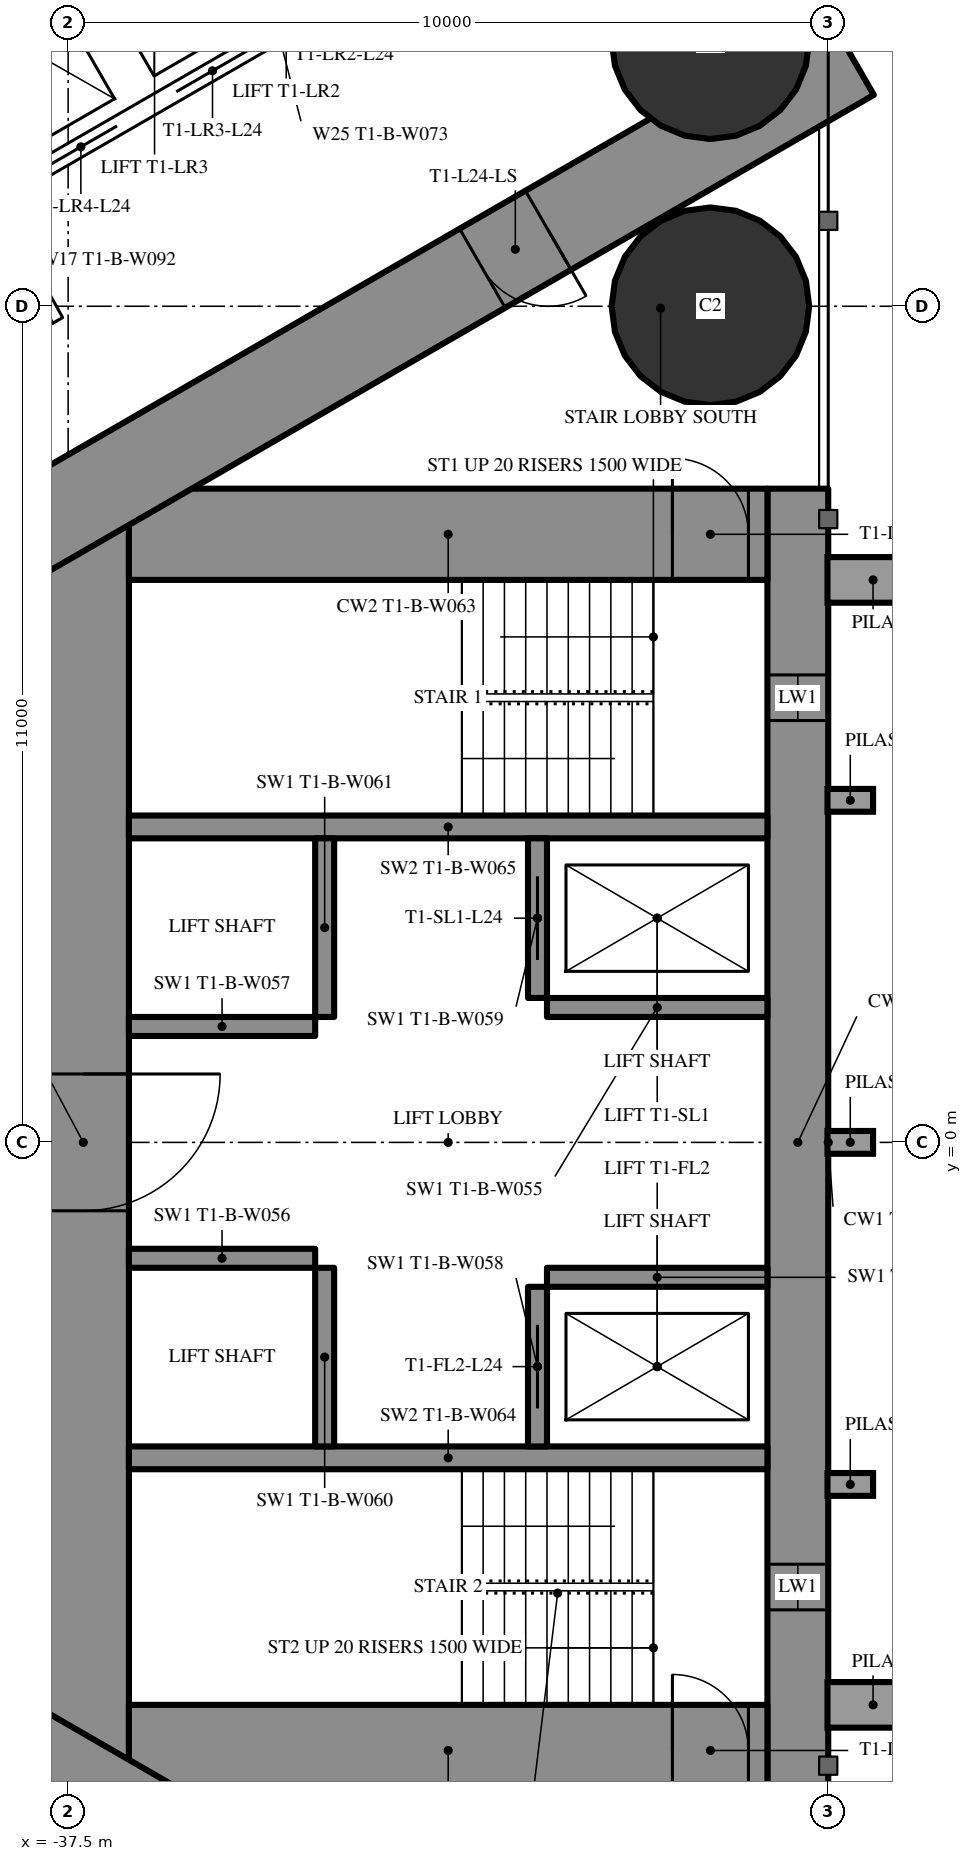
"""IFC4 building model, lengths in metres.
Left out: names, types, materials, properties, quantities, classifications, styles, units other than length and angle.
Written with IfcOpenShell. Run it as: python <this file> out.ifc"""

import sys

from ifc_helpers import new_model, si_unit, direction, frame, frame_2d, origin, origin_2d, place, context, subcontext, project, spatial, rectangle, hollow_circle, extrude, element, fill, save


model = new_model("IFC4")
c1 = context("Model", 3, precision=1e-05, world=origin(), true_north=direction((0.0, 1.0)))
c2 = subcontext(c1, "Body", "Model", "MODEL_VIEW")
j1 = project(units=[si_unit("LENGTHUNIT", "METRE"), si_unit("PLANEANGLEUNIT", "RADIAN")], contexts=[c1])
p1 = place(None, origin())
s1 = spatial("IfcSite", under=j1, at=p1, CompositionType="ELEMENT")
p2 = place(p1, origin())
s2 = spatial("IfcBuilding", under=s1, at=p2, CompositionType="ELEMENT")
p3 = place(p2, frame((0.0, 0.0, 94.1)))
s3 = spatial("IfcBuildingStorey", under=s2, at=p3, CompositionType="ELEMENT", Elevation=94.1)
for number, where, z_axis, x_axis in (
    (1, (-29.05, 11.0, 0.0), (0.0, 0.0, 1.0), (1.0, 0.0, 0.0)),
    (2, (-29.05, 14.5, 0.0), (0.0, 0.0, 1.0), (1.0, 0.0, 0.0)),
):
    element("IfcColumn", number, at=place(p3, frame(where, z_axis=z_axis, x_axis=x_axis)), inside=s3, PredefinedType="COLUMN", context=c2, shape_type="SweptSolid", body=[
        extrude(hollow_circle(Radius=1.3, WallThickness=0.1, at=origin_2d()), origin(), (0.0, 0.0, 1.0), 3.5),
    ])
p4 = place(p3, frame((-27.9, 8.6, 0.0), z_axis=(0.0, 0.0, 1.0), x_axis=(0.0, -1.0, 0.0)))
e3 = element("IfcWall", 3, at=p4, inside=s3, PredefinedType="SHEAR", context=c2, shape_type="SweptSolid", body=[
    extrude(rectangle(XDim=17.2, YDim=0.8, at=frame_2d((8.6, 0.0))), origin(), (0.0, 0.0, 1.0), 3.5),
])
p5 = place(p4, frame((2.45, 0.0, 0.6)))
e4 = element("IfcOpeningElement", 4, at=p5, cuts=e3, PredefinedType="OPENING", context=c2, shape_type="SweptSolid", body=[
    extrude(rectangle(XDim=0.6, YDim=2.1, at=frame_2d((0.3, 1.05))), frame((0.0, 0.41, 0.0), z_axis=(0.0, -1.0, 0.0), x_axis=(1.0, 0.0, 0.0)), (0.0, 0.0, 1.0), 0.82),
])
p6 = place(p4, frame((14.15, 0.0, 0.6)))
e5 = element("IfcOpeningElement", 5, at=p6, cuts=e3, PredefinedType="OPENING", context=c2, shape_type="SweptSolid", body=[
    extrude(rectangle(XDim=0.6, YDim=2.1, at=frame_2d((0.3, 1.05))), frame((0.0, 0.41, 0.0), z_axis=(0.0, -1.0, 0.0), x_axis=(1.0, 0.0, 0.0)), (0.0, 0.0, 1.0), 0.82),
])
p7 = place(p3, frame((-37.3, 8.6, 0.0), z_axis=(0.0, 0.0, 1.0), x_axis=(0.0, -1.0, 0.0)))
e6 = element("IfcWall", 6, at=p7, inside=s3, PredefinedType="SHEAR", context=c2, shape_type="SweptSolid", body=[
    extrude(rectangle(XDim=17.2, YDim=1.2, at=frame_2d((8.6, 0.0))), origin(), (0.0, 0.0, 1.0), 3.5),
])
p8 = place(p7, frame((7.7, 0.0, 0.0)))
e7 = element("IfcOpeningElement", 7, at=p8, cuts=e6, PredefinedType="OPENING", context=c2, shape_type="SweptSolid", body=[
    extrude(rectangle(XDim=1.8, YDim=2.2, at=frame_2d((0.9, 1.1))), frame((0.0, 0.61, 0.0), z_axis=(0.0, -1.0, 0.0), x_axis=(1.0, 0.0, 0.0)), (0.0, 0.0, 1.0), 1.22),
])
p9 = place(p3, frame((-28.3, 8.0, 0.0), z_axis=(0.0, 0.0, 1.0), x_axis=(-1.0, 0.0, 0.0)))
e8 = element("IfcWall", 8, at=p9, inside=s3, PredefinedType="SHEAR", context=c2, shape_type="SweptSolid", body=[
    extrude(rectangle(XDim=8.4, YDim=1.2, at=frame_2d((4.2, 0.0))), origin(), (0.0, 0.0, 1.0), 3.5),
])
p10 = place(p9, frame((0.25, 0.0, 0.0)))
e9 = element("IfcOpeningElement", 9, at=p10, cuts=e8, PredefinedType="OPENING", context=c2, shape_type="SweptSolid", body=[
    extrude(rectangle(XDim=1.0, YDim=2.2, at=frame_2d((0.5, 1.1))), frame((0.0, 0.61, 0.0), z_axis=(0.0, -1.0, 0.0), x_axis=(1.0, 0.0, 0.0)), (0.0, 0.0, 1.0), 1.22),
])
p11 = place(p3, frame((-28.3, -8.0, 0.0), z_axis=(0.0, 0.0, 1.0), x_axis=(-1.0, 0.0, 0.0)))
e10 = element("IfcWall", 10, at=p11, inside=s3, PredefinedType="SHEAR", context=c2, shape_type="SweptSolid", body=[
    extrude(rectangle(XDim=8.4, YDim=1.2, at=frame_2d((4.2, 0.0))), origin(), (0.0, 0.0, 1.0), 3.5),
])
p12 = place(p11, frame((0.25, 0.0, 0.0)))
e11 = element("IfcOpeningElement", 11, at=p12, cuts=e10, PredefinedType="OPENING", context=c2, shape_type="SweptSolid", body=[
    extrude(rectangle(XDim=1.0, YDim=2.2, at=frame_2d((0.5, 1.1))), frame((0.0, 0.61, 0.0), z_axis=(0.0, -1.0, 0.0), x_axis=(1.0, 0.0, 0.0)), (0.0, 0.0, 1.0), 1.22),
])
for number, where, z_axis, x_axis in (
    (12, (-28.3, 4.15, 0.0), (0.0, 0.0, 1.0), (-1.0, 0.0, 0.0)),
    (13, (-28.3, -4.15, 0.0), (0.0, 0.0, 1.0), (-1.0, 0.0, 0.0)),
):
    element("IfcWall", number, at=place(p3, frame(where, z_axis=z_axis, x_axis=x_axis)), inside=s3, PredefinedType="SHEAR", context=c2, shape_type="SweptSolid", body=[
        extrude(rectangle(XDim=8.4, YDim=0.3, at=frame_2d((4.2, 0.0))), origin(), (0.0, 0.0, 1.0), 3.5),
    ])
p13 = place(p3, frame((-31.325, 4.0, 0.0), z_axis=(0.0, 0.0, 1.0), x_axis=(0.0, -1.0, 0.0)))
e14 = element("IfcWall", 14, at=p13, inside=s3, PredefinedType="SHEAR", context=c2, shape_type="SweptSolid", body=[
    extrude(rectangle(XDim=2.1, YDim=0.25, at=frame_2d((1.05, 0.0))), origin(), (0.0, 0.0, 1.0), 3.5),
])
p14 = place(p13, frame((0.5, 0.0, 0.0)))
e15 = element("IfcOpeningElement", 15, at=p14, cuts=e14, PredefinedType="OPENING", context=c2, shape_type="SweptSolid", body=[
    extrude(rectangle(XDim=1.1, YDim=2.2, at=frame_2d((0.55, 1.1))), frame((0.0, 0.135, 0.0), z_axis=(0.0, -1.0, 0.0), x_axis=(1.0, 0.0, 0.0)), (0.0, 0.0, 1.0), 0.27),
])
p15 = place(p3, frame((-34.125, 4.0, 0.0), z_axis=(0.0, 0.0, 1.0), x_axis=(0.0, -1.0, 0.0)))
e16 = element("IfcWall", 16, at=p15, inside=s3, PredefinedType="SHEAR", context=c2, shape_type="SweptSolid", body=[
    extrude(rectangle(XDim=2.35, YDim=0.25, at=frame_2d((1.175, 0.0))), origin(), (0.0, 0.0, 1.0), 3.5),
])
p16 = place(p3, frame((-28.3, 1.775, 0.0), z_axis=(0.0, 0.0, 1.0), x_axis=(-1.0, 0.0, 0.0)))
e17 = element("IfcWall", 17, at=p16, inside=s3, PredefinedType="SHEAR", context=c2, shape_type="SweptSolid", body=[
    extrude(rectangle(XDim=2.9, YDim=0.25, at=frame_2d((1.45, 0.0))), origin(), (0.0, 0.0, 1.0), 3.5),
])
p17 = place(p3, frame((-34.25, 1.525, 0.0), z_axis=(0.0, 0.0, 1.0), x_axis=(-1.0, 0.0, 0.0)))
e18 = element("IfcWall", 18, at=p17, inside=s3, PredefinedType="SHEAR", context=c2, shape_type="SweptSolid", body=[
    extrude(rectangle(XDim=2.45, YDim=0.25, at=frame_2d((1.225, 0.0))), origin(), (0.0, 0.0, 1.0), 3.5),
])
p18 = place(p3, frame((-31.325, -1.9, 0.0), z_axis=(0.0, 0.0, 1.0), x_axis=(0.0, -1.0, 0.0)))
e19 = element("IfcWall", 19, at=p18, inside=s3, PredefinedType="SHEAR", context=c2, shape_type="SweptSolid", body=[
    extrude(rectangle(XDim=2.1, YDim=0.25, at=frame_2d((1.05, 0.0))), origin(), (0.0, 0.0, 1.0), 3.5),
])
p19 = place(p18, frame((0.5, 0.0, 0.0)))
e20 = element("IfcOpeningElement", 20, at=p19, cuts=e19, PredefinedType="OPENING", context=c2, shape_type="SweptSolid", body=[
    extrude(rectangle(XDim=1.1, YDim=2.2, at=frame_2d((0.55, 1.1))), frame((0.0, 0.135, 0.0), z_axis=(0.0, -1.0, 0.0), x_axis=(1.0, 0.0, 0.0)), (0.0, 0.0, 1.0), 0.27),
])
p20 = place(p3, frame((-34.125, -1.65, 0.0), z_axis=(0.0, 0.0, 1.0), x_axis=(0.0, -1.0, 0.0)))
e21 = element("IfcWall", 21, at=p20, inside=s3, PredefinedType="SHEAR", context=c2, shape_type="SweptSolid", body=[
    extrude(rectangle(XDim=2.35, YDim=0.25, at=frame_2d((1.175, 0.0))), origin(), (0.0, 0.0, 1.0), 3.5),
])
p21 = place(p3, frame((-28.3, -1.775, 0.0), z_axis=(0.0, 0.0, 1.0), x_axis=(-1.0, 0.0, 0.0)))
e22 = element("IfcWall", 22, at=p21, inside=s3, PredefinedType="SHEAR", context=c2, shape_type="SweptSolid", body=[
    extrude(rectangle(XDim=2.9, YDim=0.25, at=frame_2d((1.45, 0.0))), origin(), (0.0, 0.0, 1.0), 3.5),
])
p22 = place(p3, frame((-34.25, -1.525, 0.0), z_axis=(0.0, 0.0, 1.0), x_axis=(-1.0, 0.0, 0.0)))
e23 = element("IfcWall", 23, at=p22, inside=s3, PredefinedType="SHEAR", context=c2, shape_type="SweptSolid", body=[
    extrude(rectangle(XDim=2.45, YDim=0.25, at=frame_2d((1.225, 0.0))), origin(), (0.0, 0.0, 1.0), 3.5),
])
p23 = place(p3, frame((-27.2, 14.3, 0.0), z_axis=(0.0, 0.0, 1.0), x_axis=(-0.866026593062, -0.499997940104, 0.0)))
e24 = element("IfcWall", 24, at=p23, inside=s3, PredefinedType="SHEAR", context=c2, shape_type="SweptSolid", body=[
    extrude(rectangle(XDim=28.946, YDim=1.2, at=frame_2d((14.473, 0.0))), origin(), (0.0, 0.0, 1.0), 3.5),
])
p24 = place(p23, frame((4.6, 0.0, 0.0)))
e25 = element("IfcOpeningElement", 25, at=p24, cuts=e24, PredefinedType="OPENING", context=c2, shape_type="SweptSolid", body=[
    extrude(rectangle(XDim=1.0, YDim=2.2, at=frame_2d((0.5, 1.1))), frame((0.0, 0.61, 0.0), z_axis=(0.0, -1.0, 0.0), x_axis=(1.0, 0.0, 0.0)), (0.0, 0.0, 1.0), 1.22),
])
p25 = place(p23, frame((13.395, 0.0, 0.0)))
e26 = element("IfcOpeningElement", 26, at=p25, cuts=e24, PredefinedType="OPENING", context=c2, shape_type="SweptSolid", body=[
    extrude(rectangle(XDim=1.8, YDim=2.2, at=frame_2d((0.9, 1.1))), frame((0.0, 0.61, 0.0), z_axis=(0.0, -1.0, 0.0), x_axis=(1.0, 0.0, 0.0)), (0.0, 0.0, 1.0), 1.22),
])
p26 = place(p3, frame((-27.2, -14.3, 0.0), z_axis=(0.0, 0.0, 1.0), x_axis=(-0.866024021859, 0.500002393557, 0.0)))
e27 = element("IfcWall", 27, at=p26, inside=s3, PredefinedType="SHEAR", context=c2, shape_type="SweptSolid", body=[
    extrude(rectangle(XDim=27.907, YDim=1.2, at=frame_2d((13.954, 0.0))), origin(), (0.0, 0.0, 1.0), 3.5),
])
p27 = place(p26, frame((4.6, 0.0, 0.0)))
e28 = element("IfcOpeningElement", 28, at=p27, cuts=e27, PredefinedType="OPENING", context=c2, shape_type="SweptSolid", body=[
    extrude(rectangle(XDim=1.0, YDim=2.2, at=frame_2d((0.5, 1.1))), frame((0.0, 0.61, 0.0), z_axis=(0.0, -1.0, 0.0), x_axis=(1.0, 0.0, 0.0)), (0.0, 0.0, 1.0), 1.22),
])
p28 = place(p26, frame((13.395, 0.0, 0.0)))
e29 = element("IfcOpeningElement", 29, at=p28, cuts=e27, PredefinedType="OPENING", context=c2, shape_type="SweptSolid", body=[
    extrude(rectangle(XDim=1.8, YDim=2.2, at=frame_2d((0.9, 1.1))), frame((0.0, 0.61, 0.0), z_axis=(0.0, -1.0, 0.0), x_axis=(1.0, 0.0, 0.0)), (0.0, 0.0, 1.0), 1.22),
])
p29 = place(p3, frame((-37.7, 10.894, 0.0), z_axis=(0.0, 0.0, 1.0), x_axis=(-0.866027905338, -0.499995667157, 0.0)))
e30 = element("IfcWall", 30, at=p29, inside=s3, PredefinedType="PARTITIONING", context=c2, shape_type="SweptSolid", body=[
    extrude(rectangle(XDim=21.787, YDim=0.2, at=frame_2d((10.894, 0.0))), origin(), (0.0, 0.0, 1.0), 3.25),
])
p30 = place(p29, frame((17.887, 0.0, 0.0)))
e31 = element("IfcOpeningElement", 31, at=p30, cuts=e30, PredefinedType="OPENING", context=c2, shape_type="SweptSolid", body=[
    extrude(rectangle(XDim=0.95, YDim=2.2, at=frame_2d((0.475, 1.1))), frame((0.0, 0.11, 0.0), z_axis=(0.0, -1.0, 0.0), x_axis=(1.0, 0.0, 0.0)), (0.0, 0.0, 1.0), 0.22),
])
p31 = place(p29, frame((9.531, 0.0, 0.0)))
e32 = element("IfcOpeningElement", 32, at=p31, cuts=e30, PredefinedType="OPENING", context=c2, shape_type="SweptSolid", body=[
    extrude(rectangle(XDim=0.95, YDim=2.2, at=frame_2d((0.475, 1.1))), frame((0.0, 0.11, 0.0), z_axis=(0.0, -1.0, 0.0), x_axis=(1.0, 0.0, 0.0)), (0.0, 0.0, 1.0), 0.22),
])
p32 = place(p3, frame((-36.92, -11.344, 0.0), z_axis=(0.0, 0.0, 1.0), x_axis=(-0.866028313256, 0.499994960614, 0.0)))
e33 = element("IfcWall", 33, at=p32, inside=s3, PredefinedType="PARTITIONING", context=c2, shape_type="SweptSolid", body=[
    extrude(rectangle(XDim=22.568, YDim=0.2, at=frame_2d((11.284, 0.0))), origin(), (0.0, 0.0, 1.0), 3.25),
])
p33 = place(p32, frame((14.481, 0.0, 0.0)))
e34 = element("IfcOpeningElement", 34, at=p33, cuts=e33, PredefinedType="OPENING", context=c2, shape_type="SweptSolid", body=[
    extrude(rectangle(XDim=0.95, YDim=2.2, at=frame_2d((0.475, 1.1))), frame((0.0, 0.11, 0.0), z_axis=(0.0, -1.0, 0.0), x_axis=(1.0, 0.0, 0.0)), (0.0, 0.0, 1.0), 0.22),
])
p34 = place(p32, frame((3.35, 0.0, 0.0)))
e35 = element("IfcOpeningElement", 35, at=p34, cuts=e33, PredefinedType="OPENING", context=c2, shape_type="SweptSolid", body=[
    extrude(rectangle(XDim=1.0, YDim=2.2, at=frame_2d((0.5, 1.1))), frame((0.0, 0.11, 0.0), z_axis=(0.0, -1.0, 0.0), x_axis=(1.0, 0.0, 0.0)), (0.0, 0.0, 1.0), 0.22),
])
p35 = place(p3, frame((-38.513, 12.392, 0.0), z_axis=(0.0, 0.0, 1.0), x_axis=(0.485585508183, -0.874189175317, 0.0)))
e36 = element("IfcWall", 36, at=p35, inside=s3, PredefinedType="PARTITIONING", context=c2, shape_type="SweptSolid", body=[
    extrude(rectangle(XDim=1.805, YDim=0.15, at=frame_2d((0.902, 0.0))), origin(), (0.0, 0.0, 1.0), 3.25),
])
p36 = place(p3, frame((-31.01, 16.747, 0.0), z_axis=(0.0, 0.0, 1.0), x_axis=(-0.866028165386, -0.499995216735, 0.0)))
e37 = element("IfcWall", 37, at=p36, inside=s3, PredefinedType="PARTITIONING", context=c2, shape_type="SweptSolid", body=[
    extrude(rectangle(XDim=8.6, YDim=0.25, at=frame_2d((4.3, 0.0))), origin(), (0.0, 0.0, 1.0), 3.25),
])
p37 = place(p36, frame((0.75, 0.0, 0.0)))
e38 = element("IfcOpeningElement", 38, at=p37, cuts=e37, PredefinedType="OPENING", context=c2, shape_type="SweptSolid", body=[
    extrude(rectangle(XDim=1.1, YDim=2.2, at=frame_2d((0.55, 1.1))), frame((0.0, 0.135, 0.0), z_axis=(0.0, -1.0, 0.0), x_axis=(1.0, 0.0, 0.0)), (0.0, 0.0, 1.0), 0.27),
])
p38 = place(p36, frame((2.75, 0.0, 0.0)))
e39 = element("IfcOpeningElement", 39, at=p38, cuts=e37, PredefinedType="OPENING", context=c2, shape_type="SweptSolid", body=[
    extrude(rectangle(XDim=1.1, YDim=2.2, at=frame_2d((0.55, 1.1))), frame((0.0, 0.135, 0.0), z_axis=(0.0, -1.0, 0.0), x_axis=(1.0, 0.0, 0.0)), (0.0, 0.0, 1.0), 0.27),
])
p39 = place(p36, frame((4.75, 0.0, 0.0)))
e40 = element("IfcOpeningElement", 40, at=p39, cuts=e37, PredefinedType="OPENING", context=c2, shape_type="SweptSolid", body=[
    extrude(rectangle(XDim=1.1, YDim=2.2, at=frame_2d((0.55, 1.1))), frame((0.0, 0.135, 0.0), z_axis=(0.0, -1.0, 0.0), x_axis=(1.0, 0.0, 0.0)), (0.0, 0.0, 1.0), 0.27),
])
p40 = place(p36, frame((6.75, 0.0, 0.0)))
e41 = element("IfcOpeningElement", 41, at=p40, cuts=e37, PredefinedType="OPENING", context=c2, shape_type="SweptSolid", body=[
    extrude(rectangle(XDim=1.1, YDim=2.2, at=frame_2d((0.55, 1.1))), frame((0.0, 0.135, 0.0), z_axis=(0.0, -1.0, 0.0), x_axis=(1.0, 0.0, 0.0)), (0.0, 0.0, 1.0), 0.27),
])
p41 = place(p24, origin())
e42 = element("IfcDoor", 42, at=p41, inside=s3, OperationType="SINGLE_SWING_LEFT", PredefinedType="DOOR", context=c2, shape_type="SweptSolid", body=[
    extrude(rectangle(XDim=1.0, YDim=2.2, at=frame_2d((0.5, 1.1))), frame((0.0, 0.025, 0.0), z_axis=(0.0, -1.0, 0.0), x_axis=(1.0, 0.0, 0.0)), (0.0, 0.0, 1.0), 0.05),
])
fill(e25, e42)
p42 = place(p8, origin())
e43 = element("IfcDoor", 43, at=p42, inside=s3, OperationType="DOUBLE_DOOR_SINGLE_SWING", PredefinedType="DOOR", context=c2, shape_type="SweptSolid", body=[
    extrude(rectangle(XDim=1.8, YDim=2.2, at=frame_2d((0.9, 1.1))), frame((0.0, 0.025, 0.0), z_axis=(0.0, -1.0, 0.0), x_axis=(1.0, 0.0, 0.0)), (0.0, 0.0, 1.0), 0.05),
])
fill(e7, e43)
p43 = place(p10, origin())
e44 = element("IfcDoor", 44, at=p43, inside=s3, OperationType="SINGLE_SWING_RIGHT", PredefinedType="DOOR", context=c2, shape_type="SweptSolid", body=[
    extrude(rectangle(XDim=1.0, YDim=2.2, at=frame_2d((0.5, 1.1))), frame((0.0, 0.025, 0.0), z_axis=(0.0, -1.0, 0.0), x_axis=(1.0, 0.0, 0.0)), (0.0, 0.0, 1.0), 0.05),
])
fill(e9, e44)
p44 = place(p12, origin())
e45 = element("IfcDoor", 45, at=p44, inside=s3, OperationType="SINGLE_SWING_RIGHT", PredefinedType="DOOR", context=c2, shape_type="SweptSolid", body=[
    extrude(rectangle(XDim=1.0, YDim=2.2, at=frame_2d((0.5, 1.1))), frame((0.0, 0.025, 0.0), z_axis=(0.0, -1.0, 0.0), x_axis=(1.0, 0.0, 0.0)), (0.0, 0.0, 1.0), 0.05),
])
fill(e11, e45)
p45 = place(p14, origin())
e46 = element("IfcDoor", 46, at=p45, inside=s3, OperationType="SLIDING_TO_LEFT", PredefinedType="USERDEFINED", context=c2, shape_type="SweptSolid", body=[
    extrude(rectangle(XDim=1.1, YDim=2.2, at=frame_2d((0.55, 1.1))), frame((0.0, 0.025, 0.0), z_axis=(0.0, -1.0, 0.0), x_axis=(1.0, 0.0, 0.0)), (0.0, 0.0, 1.0), 0.05),
])
fill(e15, e46)
p46 = place(p19, origin())
e47 = element("IfcDoor", 47, at=p46, inside=s3, OperationType="SLIDING_TO_LEFT", PredefinedType="USERDEFINED", context=c2, shape_type="SweptSolid", body=[
    extrude(rectangle(XDim=1.1, YDim=2.2, at=frame_2d((0.55, 1.1))), frame((0.0, 0.025, 0.0), z_axis=(0.0, -1.0, 0.0), x_axis=(1.0, 0.0, 0.0)), (0.0, 0.0, 1.0), 0.05),
])
fill(e20, e47)
p47 = place(p39, origin())
e48 = element("IfcDoor", 48, at=p47, inside=s3, OperationType="DOUBLE_DOOR_SLIDING", PredefinedType="USERDEFINED", context=c2, shape_type="SweptSolid", body=[
    extrude(rectangle(XDim=1.1, YDim=2.2, at=frame_2d((0.55, 1.1))), frame((0.0, 0.025, 0.0), z_axis=(0.0, -1.0, 0.0), x_axis=(1.0, 0.0, 0.0)), (0.0, 0.0, 1.0), 0.05),
])
fill(e40, e48)
p48 = place(p40, origin())
e49 = element("IfcDoor", 49, at=p48, inside=s3, OperationType="DOUBLE_DOOR_SLIDING", PredefinedType="USERDEFINED", context=c2, shape_type="SweptSolid", body=[
    extrude(rectangle(XDim=1.1, YDim=2.2, at=frame_2d((0.55, 1.1))), frame((0.0, 0.025, 0.0), z_axis=(0.0, -1.0, 0.0), x_axis=(1.0, 0.0, 0.0)), (0.0, 0.0, 1.0), 0.05),
])
fill(e41, e49)
p49 = place(p5, origin())
e50 = element("IfcWindow", 50, at=p49, inside=s3, PartitioningType="SINGLE_PANEL", PredefinedType="WINDOW", context=c2, shape_type="SweptSolid", body=[
    extrude(rectangle(XDim=0.6, YDim=2.1, at=frame_2d((0.3, 1.05))), frame((0.0, 0.03, 0.0), z_axis=(0.0, -1.0, 0.0), x_axis=(1.0, 0.0, 0.0)), (0.0, 0.0, 1.0), 0.06),
])
fill(e4, e50)
p50 = place(p6, origin())
e51 = element("IfcWindow", 51, at=p50, inside=s3, PartitioningType="SINGLE_PANEL", PredefinedType="WINDOW", context=c2, shape_type="SweptSolid", body=[
    extrude(rectangle(XDim=0.6, YDim=2.1, at=frame_2d((0.3, 1.05))), frame((0.0, 0.03, 0.0), z_axis=(0.0, -1.0, 0.0), x_axis=(1.0, 0.0, 0.0)), (0.0, 0.0, 1.0), 0.06),
])
fill(e5, e51)
save(model, sys.argv[1])
